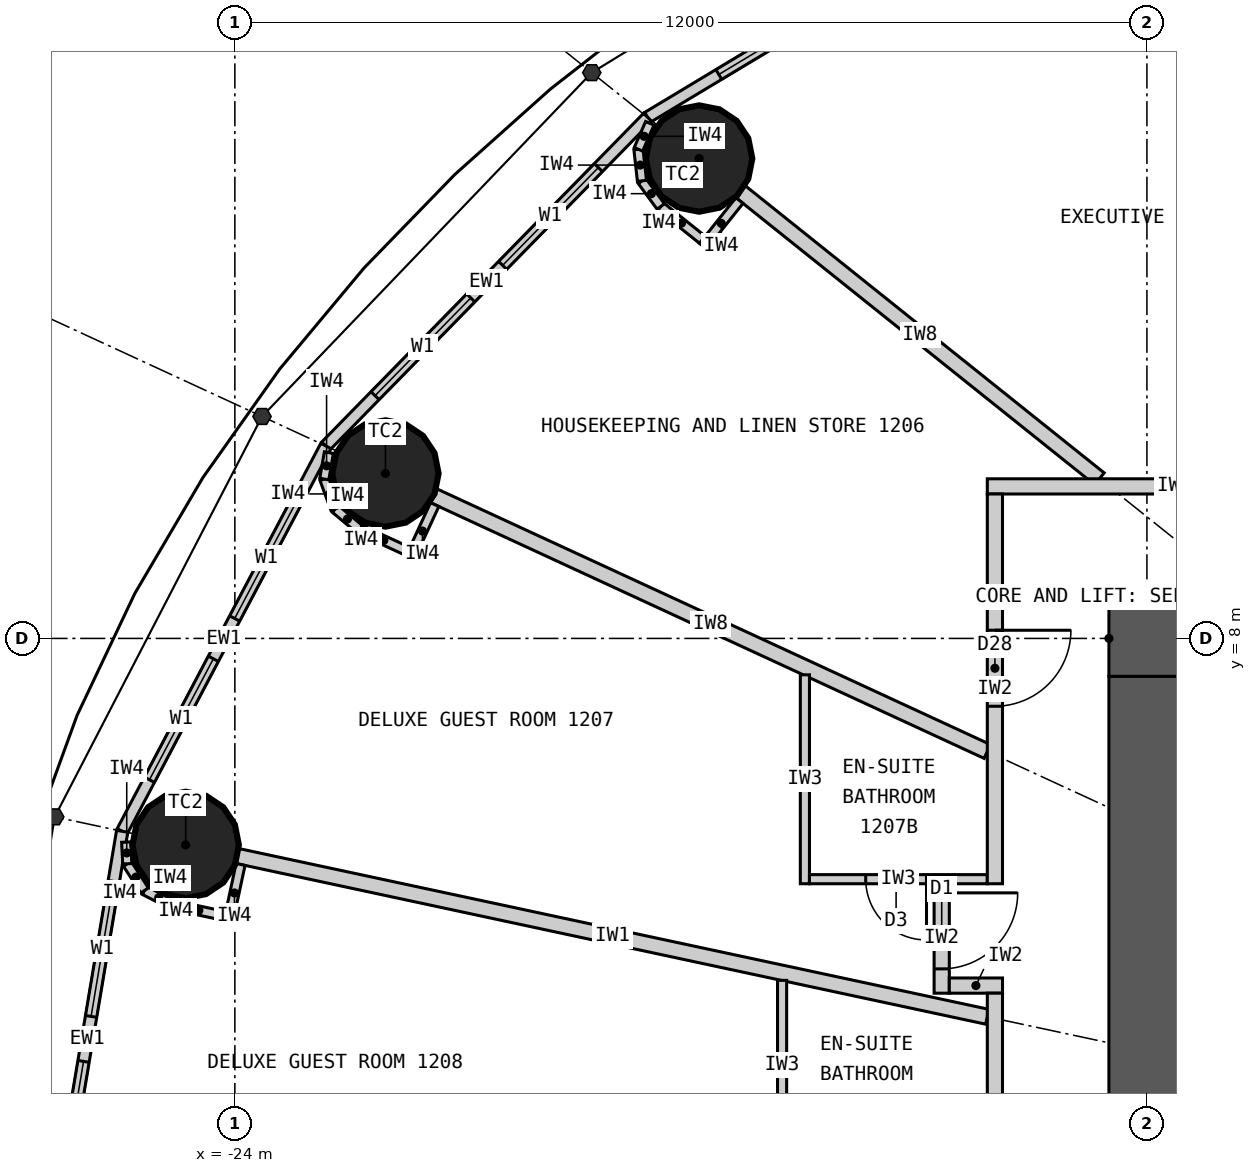
"""IFC4 building model, lengths in metres.
Left out: names, types, materials, properties, quantities, classifications, styles, units other than length and angle.
Written with IfcOpenShell. Run it as: python <this file> out.ifc"""

import sys

from ifc_helpers import new_model, si_unit, direction, frame, frame_2d, origin, origin_2d, place, context, subcontext, project, spatial, rectangle, circle, extrude, element, fill, save


model = new_model("IFC4")
c1 = context("Model", 3, precision=1e-05, world=origin(), true_north=direction((0.0, 1.0)))
c2 = subcontext(c1, "Body", "Model", "MODEL_VIEW")
j1 = project(units=[si_unit("LENGTHUNIT", "METRE"), si_unit("PLANEANGLEUNIT", "RADIAN")], contexts=[c1])
p1 = place(None, origin())
s1 = spatial("IfcSite", under=j1, at=p1, CompositionType="ELEMENT")
p2 = place(p1, origin())
s2 = spatial("IfcBuilding", under=s1, at=p2, CompositionType="ELEMENT")
p3 = place(p2, frame((0.0, 0.0, 54.0)))
s3 = spatial("IfcBuildingStorey", under=s2, at=p3, CompositionType="ELEMENT", Elevation=54.0)
for number, where, z_axis, x_axis in (
    (1, (-17.892, 14.313, 0.0), (0.0, 0.0, 1.0), (1.0, 0.0, 0.0)),
    (2, (-22.019, 10.17, 0.0), (0.0, 0.0, 1.0), (1.0, 0.0, 0.0)),
    (3, (-24.647, 5.283, 0.0), (0.0, 0.0, 1.0), (1.0, 0.0, 0.0)),
):
    element("IfcColumn", number, at=place(p3, frame(where, z_axis=z_axis, x_axis=x_axis)), inside=s3, PredefinedType="COLUMN", context=c2, shape_type="SweptSolid", body=[
        extrude(circle(Radius=0.7, at=origin_2d()), origin(), (0.0, 0.0, 1.0), 3.3),
    ])
p4 = place(p3, frame((-12.5, 8.0, 0.0), z_axis=(0.0, 0.0, 1.0), x_axis=(1.0, 0.0, 0.0)))
e4 = element("IfcWall", 4, at=p4, inside=s3, PredefinedType="SHEAR", context=c2, shape_type="SweptSolid", body=[
    extrude(rectangle(XDim=25.0, YDim=1.0, at=frame_2d((12.5, 0.0))), origin(), (0.0, 0.0, 1.0), 3.3),
])
p5 = place(p4, frame((11.2, 0.0, 0.0)))
e5 = element("IfcOpeningElement", 5, at=p5, cuts=e4, PredefinedType="OPENING", context=c2, shape_type="SweptSolid", body=[
    extrude(rectangle(XDim=1.2, YDim=2.2, at=frame_2d((0.6, 1.1))), frame((0.0, 0.51, 0.0), z_axis=(0.0, -1.0, 0.0), x_axis=(1.0, 0.0, 0.0)), (0.0, 0.0, 1.0), 1.02),
])
p6 = place(p4, frame((18.8, 0.0, 0.0)))
e6 = element("IfcOpeningElement", 6, at=p6, cuts=e4, PredefinedType="OPENING", context=c2, shape_type="SweptSolid", body=[
    extrude(rectangle(XDim=0.9, YDim=2.2, at=frame_2d((0.45, 1.1))), frame((0.0, 0.51, 0.0), z_axis=(0.0, -1.0, 0.0), x_axis=(1.0, 0.0, 0.0)), (0.0, 0.0, 1.0), 1.02),
])
p7 = place(p3, frame((-12.0, 7.5, 0.0), z_axis=(0.0, 0.0, 1.0), x_axis=(0.0, -1.0, 0.0)))
e7 = element("IfcWall", 7, at=p7, inside=s3, PredefinedType="SHEAR", context=c2, shape_type="SweptSolid", body=[
    extrude(rectangle(XDim=15.0, YDim=1.0, at=frame_2d((7.5, 0.0))), origin(), (0.0, 0.0, 1.0), 3.3),
])
p8 = place(p7, frame((6.6, 0.0, 0.0)))
e8 = element("IfcOpeningElement", 8, at=p8, cuts=e7, PredefinedType="OPENING", context=c2, shape_type="SweptSolid", body=[
    extrude(rectangle(XDim=1.8, YDim=2.2, at=frame_2d((0.9, 1.1))), frame((0.0, 0.51, 0.0), z_axis=(0.0, -1.0, 0.0), x_axis=(1.0, 0.0, 0.0)), (0.0, 0.0, 1.0), 1.02),
])
p9 = place(p3, frame((-13.096, 18.147, 0.0), z_axis=(0.0, 0.0, 1.0), x_axis=(-0.856983180864, -0.515344377787, 0.0)))
e9 = element("IfcWall", 9, at=p9, inside=s3, PredefinedType="ELEMENTEDWALL", context=c2, shape_type="SweptSolid", body=[
    extrude(rectangle(XDim=6.386, YDim=0.15, at=frame_2d((3.193, 0.0))), origin(), (0.0, 0.0, 1.0), 3.12),
])
p10 = place(p9, frame((1.093, 0.0, 0.9)))
e10 = element("IfcOpeningElement", 10, at=p10, cuts=e9, PredefinedType="OPENING", context=c2, shape_type="SweptSolid", body=[
    extrude(rectangle(XDim=1.8, YDim=1.9, at=frame_2d((0.9, 0.95))), frame((0.0, 0.085, 0.0), z_axis=(0.0, -1.0, 0.0), x_axis=(1.0, 0.0, 0.0)), (0.0, 0.0, 1.0), 0.17),
])
p11 = place(p9, frame((3.493, 0.0, 0.9)))
e11 = element("IfcOpeningElement", 11, at=p11, cuts=e9, PredefinedType="OPENING", context=c2, shape_type="SweptSolid", body=[
    extrude(rectangle(XDim=1.8, YDim=1.9, at=frame_2d((0.9, 0.95))), frame((0.0, 0.085, 0.0), z_axis=(0.0, -1.0, 0.0), x_axis=(1.0, 0.0, 0.0)), (0.0, 0.0, 1.0), 0.17),
])
p12 = place(p3, frame((-18.57, 14.856, 0.0), z_axis=(0.0, 0.0, 1.0), x_axis=(-0.699602905915, -0.714531856557, 0.0)))
e12 = element("IfcWall", 12, at=p12, inside=s3, PredefinedType="ELEMENTEDWALL", context=c2, shape_type="SweptSolid", body=[
    extrude(rectangle(XDim=6.051, YDim=0.15, at=frame_2d((3.025, 0.0))), origin(), (0.0, 0.0, 1.0), 3.12),
])
p13 = place(p12, frame((0.926, 0.0, 0.9)))
e13 = element("IfcOpeningElement", 13, at=p13, cuts=e12, PredefinedType="OPENING", context=c2, shape_type="SweptSolid", body=[
    extrude(rectangle(XDim=1.8, YDim=1.9, at=frame_2d((0.9, 0.95))), frame((0.0, 0.085, 0.0), z_axis=(0.0, -1.0, 0.0), x_axis=(1.0, 0.0, 0.0)), (0.0, 0.0, 1.0), 0.17),
])
p14 = place(p12, frame((3.325, 0.0, 0.9)))
e14 = element("IfcOpeningElement", 14, at=p14, cuts=e12, PredefinedType="OPENING", context=c2, shape_type="SweptSolid", body=[
    extrude(rectangle(XDim=1.8, YDim=1.9, at=frame_2d((0.9, 0.95))), frame((0.0, 0.085, 0.0), z_axis=(0.0, -1.0, 0.0), x_axis=(1.0, 0.0, 0.0)), (0.0, 0.0, 1.0), 0.17),
])
p15 = place(p3, frame((-22.803, 10.532, 0.0), z_axis=(0.0, 0.0, 1.0), x_axis=(-0.467296867008, -0.884100468321, 0.0)))
e15 = element("IfcWall", 15, at=p15, inside=s3, PredefinedType="ELEMENTEDWALL", context=c2, shape_type="SweptSolid", body=[
    extrude(rectangle(XDim=5.734, YDim=0.15, at=frame_2d((2.867, 0.0))), origin(), (0.0, 0.0, 1.0), 3.12),
])
p16 = place(p15, frame((0.767, 0.0, 0.9)))
e16 = element("IfcOpeningElement", 16, at=p16, cuts=e15, PredefinedType="OPENING", context=c2, shape_type="SweptSolid", body=[
    extrude(rectangle(XDim=1.8, YDim=1.9, at=frame_2d((0.9, 0.95))), frame((0.0, 0.085, 0.0), z_axis=(0.0, -1.0, 0.0), x_axis=(1.0, 0.0, 0.0)), (0.0, 0.0, 1.0), 0.17),
])
p17 = place(p15, frame((3.167, 0.0, 0.9)))
e17 = element("IfcOpeningElement", 17, at=p17, cuts=e15, PredefinedType="OPENING", context=c2, shape_type="SweptSolid", body=[
    extrude(rectangle(XDim=1.8, YDim=1.9, at=frame_2d((0.9, 0.95))), frame((0.0, 0.085, 0.0), z_axis=(0.0, -1.0, 0.0), x_axis=(1.0, 0.0, 0.0)), (0.0, 0.0, 1.0), 0.17),
])
p18 = place(p3, frame((-25.482, 5.462, 0.0), z_axis=(0.0, 0.0, 1.0), x_axis=(-0.165642551694, -0.986185857264, 0.0)))
e18 = element("IfcWall", 18, at=p18, inside=s3, PredefinedType="ELEMENTEDWALL", context=c2, shape_type="SweptSolid", body=[
    extrude(rectangle(XDim=5.539, YDim=0.15, at=frame_2d((2.77, 0.0))), origin(), (0.0, 0.0, 1.0), 3.12),
])
p19 = place(p18, frame((0.669, 0.0, 0.9)))
e19 = element("IfcOpeningElement", 19, at=p19, cuts=e18, PredefinedType="OPENING", context=c2, shape_type="SweptSolid", body=[
    extrude(rectangle(XDim=1.8, YDim=1.9, at=frame_2d((0.9, 0.95))), frame((0.0, 0.085, 0.0), z_axis=(0.0, -1.0, 0.0), x_axis=(1.0, 0.0, 0.0)), (0.0, 0.0, 1.0), 0.17),
])
p20 = place(p18, frame((3.07, 0.0, 0.9)))
e20 = element("IfcOpeningElement", 20, at=p20, cuts=e18, PredefinedType="OPENING", context=c2, shape_type="SweptSolid", body=[
    extrude(rectangle(XDim=1.8, YDim=1.9, at=frame_2d((0.9, 0.95))), frame((0.0, 0.085, 0.0), z_axis=(0.0, -1.0, 0.0), x_axis=(1.0, 0.0, 0.0)), (0.0, 0.0, 1.0), 0.17),
])
p21 = place(p3, frame((-12.625, 10.1, 0.0), z_axis=(0.0, 0.0, 1.0), x_axis=(-0.780892451574, 0.624665493744, 0.0)))
e21 = element("IfcWall", 21, at=p21, inside=s3, PredefinedType="PARTITIONING", context=c2, shape_type="SweptSolid", body=[
    extrude(rectangle(XDim=6.045, YDim=0.2, at=frame_2d((3.022, 0.0))), origin(), (0.0, 0.0, 1.0), 2.32),
])
p22 = place(p3, frame((-14.1, 6.512, 0.0), z_axis=(0.0, 0.0, 1.0), x_axis=(-0.907832871056, 0.419332181247, 0.0)))
e22 = element("IfcWall", 22, at=p22, inside=s3, PredefinedType="PARTITIONING", context=c2, shape_type="SweptSolid", body=[
    extrude(rectangle(XDim=8.023, YDim=0.2, at=frame_2d((4.011, 0.0))), origin(), (0.0, 0.0, 1.0), 2.32),
])
p23 = place(p3, frame((-14.1, 3.022, 0.0), z_axis=(0.0, 0.0, 1.0), x_axis=(-0.977790014929, 0.209586943072, 0.0)))
e23 = element("IfcWall", 23, at=p23, inside=s3, PredefinedType="PARTITIONING", context=c2, shape_type="SweptSolid", body=[
    extrude(rectangle(XDim=10.087, YDim=0.2, at=frame_2d((5.043, 0.0))), origin(), (0.0, 0.0, 1.0), 2.32),
])
p24 = place(p3, frame((-16.5, 7.521, 0.0), z_axis=(0.0, 0.0, 1.0), x_axis=(0.0, -1.0, 0.0)))
e24 = element("IfcWall", 24, at=p24, inside=s3, PredefinedType="PARTITIONING", context=c2, shape_type="SweptSolid", body=[
    extrude(rectangle(XDim=2.749, YDim=0.12, at=frame_2d((1.374, 0.0))), origin(), (0.0, 0.0, 1.0), 3.12),
])
p25 = place(p3, frame((-14.1, 4.833, 0.0), z_axis=(0.0, 0.0, 1.0), x_axis=(-1.0, 0.0, 0.0)))
e25 = element("IfcWall", 25, at=p25, inside=s3, PredefinedType="PARTITIONING", context=c2, shape_type="SweptSolid", body=[
    extrude(rectangle(XDim=2.34, YDim=0.12, at=frame_2d((1.17, 0.0))), origin(), (0.0, 0.0, 1.0), 3.12),
])
p26 = place(p25, frame((0.8, 0.0, 0.0)))
e26 = element("IfcOpeningElement", 26, at=p26, cuts=e25, PredefinedType="OPENING", context=c2, shape_type="SweptSolid", body=[
    extrude(rectangle(XDim=0.8, YDim=2.1, at=frame_2d((0.4, 1.05))), frame((0.0, 0.07, 0.0), z_axis=(0.0, -1.0, 0.0), x_axis=(1.0, 0.0, 0.0)), (0.0, 0.0, 1.0), 0.14),
])
p27 = place(p3, frame((-16.8, 3.501, 0.0), z_axis=(0.0, 0.0, 1.0), x_axis=(0.0, -1.0, 0.0)))
e27 = element("IfcWall", 27, at=p27, inside=s3, PredefinedType="PARTITIONING", context=c2, shape_type="SweptSolid", body=[
    extrude(rectangle(XDim=2.219, YDim=0.12, at=frame_2d((1.109, 0.0))), origin(), (0.0, 0.0, 1.0), 3.12),
])
p28 = place(p3, frame((-14.7, 4.772, 0.0), z_axis=(0.0, 0.0, 1.0), x_axis=(0.0, -1.0, 0.0)))
e28 = element("IfcWall", 28, at=p28, inside=s3, PredefinedType="PARTITIONING", context=c2, shape_type="SweptSolid", body=[
    extrude(rectangle(XDim=1.44, YDim=0.2, at=frame_2d((0.72, 0.0))), origin(), (0.0, 0.0, 1.0), 3.12),
])
p29 = place(p28, frame((0.12, 0.0, 0.0)))
e29 = element("IfcOpeningElement", 29, at=p29, cuts=e28, PredefinedType="OPENING", context=c2, shape_type="SweptSolid", body=[
    extrude(rectangle(XDim=1.0, YDim=2.2, at=frame_2d((0.5, 1.1))), frame((0.0, 0.11, 0.0), z_axis=(0.0, -1.0, 0.0), x_axis=(1.0, 0.0, 0.0)), (0.0, 0.0, 1.0), 0.22),
])
p30 = place(p3, frame((-13.9, 3.433, 0.0), z_axis=(0.0, 0.0, 1.0), x_axis=(-1.0, 0.0, 0.0)))
e30 = element("IfcWall", 30, at=p30, inside=s3, PredefinedType="PARTITIONING", context=c2, shape_type="SweptSolid", body=[
    extrude(rectangle(XDim=0.7, YDim=0.2, at=frame_2d((0.35, 0.0))), origin(), (0.0, 0.0, 1.0), 2.32),
])
p31 = place(p3, frame((-14.1, 10.0, 0.0), z_axis=(0.0, 0.0, 1.0), x_axis=(1.0, 0.0, 0.0)))
e31 = element("IfcWall", 31, at=p31, inside=s3, PredefinedType="PARTITIONING", context=c2, shape_type="SweptSolid", body=[
    extrude(rectangle(XDim=4.931, YDim=0.2, at=frame_2d((2.466, 0.0))), origin(), (0.0, 0.0, 1.0), 3.12),
])
p32 = place(p3, frame((-14.0, 9.9, 0.0), z_axis=(0.0, 0.0, 1.0), x_axis=(0.0, -1.0, 0.0)))
e32 = element("IfcWall", 32, at=p32, inside=s3, PredefinedType="PARTITIONING", context=c2, shape_type="SweptSolid", body=[
    extrude(rectangle(XDim=5.127, YDim=0.2, at=frame_2d((2.564, 0.0))), origin(), (0.0, 0.0, 1.0), 3.12),
])
p33 = place(p32, frame((1.792, 0.0, 0.0)))
e33 = element("IfcOpeningElement", 33, at=p33, cuts=e32, PredefinedType="OPENING", context=c2, shape_type="SweptSolid", body=[
    extrude(rectangle(XDim=1.0, YDim=2.2, at=frame_2d((0.5, 1.1))), frame((0.0, 0.11, 0.0), z_axis=(0.0, -1.0, 0.0), x_axis=(1.0, 0.0, 0.0)), (0.0, 0.0, 1.0), 0.22),
])
p34 = place(p3, frame((-14.0, 3.333, 0.0), z_axis=(0.0, 0.0, 1.0), x_axis=(0.0, -1.0, 0.0)))
e34 = element("IfcWall", 34, at=p34, inside=s3, PredefinedType="PARTITIONING", context=c2, shape_type="SweptSolid", body=[
    extrude(rectangle(XDim=6.665, YDim=0.2, at=frame_2d((3.333, 0.0))), origin(), (0.0, 0.0, 1.0), 3.12),
])
p35 = place(p34, frame((2.15, 0.0, 0.0)))
e35 = element("IfcOpeningElement", 35, at=p35, cuts=e34, PredefinedType="OPENING", context=c2, shape_type="SweptSolid", body=[
    extrude(rectangle(XDim=1.0, YDim=2.2, at=frame_2d((0.5, 1.1))), frame((0.0, 0.11, 0.0), z_axis=(0.0, -1.0, 0.0), x_axis=(1.0, 0.0, 0.0)), (0.0, 0.0, 1.0), 0.22),
])
p36 = place(p34, frame((5.173, 0.0, 0.0)))
e36 = element("IfcOpeningElement", 36, at=p36, cuts=e34, PredefinedType="OPENING", context=c2, shape_type="SweptSolid", body=[
    extrude(rectangle(XDim=1.0, YDim=2.2, at=frame_2d((0.5, 1.1))), frame((0.0, 0.11, 0.0), z_axis=(0.0, -1.0, 0.0), x_axis=(1.0, 0.0, 0.0)), (0.0, 0.0, 1.0), 0.22),
])
p37 = place(p3, frame((-17.361, 13.76, 0.0), z_axis=(0.0, 0.0, 1.0), x_axis=(-0.624501042889, -0.781023973659, 0.0)))
e37 = element("IfcWall", 37, at=p37, inside=s3, PredefinedType="PARTITIONING", context=c2, shape_type="SweptSolid", body=[
    extrude(rectangle(XDim=0.767, YDim=0.12, at=frame_2d((0.384, 0.0))), origin(), (0.0, 0.0, 1.0), 3.12),
])
p38 = place(p3, frame((-17.85, 13.246, 0.0), z_axis=(0.0, 0.0, 1.0), x_axis=(-0.780902834923, 0.62465251333, 0.0)))
e38 = element("IfcWall", 38, at=p38, inside=s3, PredefinedType="PARTITIONING", context=c2, shape_type="SweptSolid", body=[
    extrude(rectangle(XDim=0.7, YDim=0.12, at=frame_2d((0.35, 0.0))), origin(), (0.0, 0.0, 1.0), 3.12),
])
for number, where, z_axis, x_axis in (
    (39, (-18.396, 13.683, 0.0), (0.0, 0.0, 1.0), (-0.592, 0.806, 0.0)),
    (40, (-18.644, 14.02, 0.0), (0.0, 0.0, 1.0), (-0.11, 0.994, 0.0)),
):
    element("IfcWall", number, at=place(p3, frame(where, z_axis=z_axis, x_axis=x_axis)), inside=s3, PredefinedType="PARTITIONING", context=c2, shape_type="SweptSolid", body=[
        extrude(rectangle(XDim=0.418, YDim=0.12, at=frame_2d((0.209, 0.0))), origin(), (0.0, 0.0, 1.0), 3.12),
    ])
p39 = place(p3, frame((-18.69, 14.435, 0.0), z_axis=(0.0, 0.0, 1.0), x_axis=(0.401093412634, 0.91603715773, 0.0)))
e41 = element("IfcWall", 41, at=p39, inside=s3, PredefinedType="PARTITIONING", context=c2, shape_type="SweptSolid", body=[
    extrude(rectangle(XDim=0.373, YDim=0.12, at=frame_2d((0.187, 0.0))), origin(), (0.0, 0.0, 1.0), 3.12),
])
p40 = place(p3, frame((-21.371, 9.761, 0.0), z_axis=(0.0, 0.0, 1.0), x_axis=(-0.419259891039, -0.907866258744, 0.0)))
e42 = element("IfcWall", 42, at=p40, inside=s3, PredefinedType="PARTITIONING", context=c2, shape_type="SweptSolid", body=[
    extrude(rectangle(XDim=0.768, YDim=0.12, at=frame_2d((0.384, 0.0))), origin(), (0.0, 0.0, 1.0), 3.12),
])
p41 = place(p3, frame((-21.722, 9.144, 0.0), z_axis=(0.0, 0.0, 1.0), x_axis=(-0.907877701396, 0.419235112208, 0.0)))
e43 = element("IfcWall", 43, at=p41, inside=s3, PredefinedType="PARTITIONING", context=c2, shape_type="SweptSolid", body=[
    extrude(rectangle(XDim=0.7, YDim=0.12, at=frame_2d((0.35, 0.0))), origin(), (0.0, 0.0, 1.0), 3.12),
])
p42 = place(p3, frame((-22.358, 9.437, 0.0), z_axis=(0.0, 0.0, 1.0), x_axis=(-0.768412687942, 0.639954639806, 0.0)))
e44 = element("IfcWall", 44, at=p42, inside=s3, PredefinedType="PARTITIONING", context=c2, shape_type="SweptSolid", body=[
    extrude(rectangle(XDim=0.418, YDim=0.12, at=frame_2d((0.209, 0.0))), origin(), (0.0, 0.0, 1.0), 3.12),
])
p43 = place(p3, frame((-22.679, 9.705, 0.0), z_axis=(0.0, 0.0, 1.0), x_axis=(-0.345164001646, 0.938542386879, 0.0)))
e45 = element("IfcWall", 45, at=p43, inside=s3, PredefinedType="PARTITIONING", context=c2, shape_type="SweptSolid", body=[
    extrude(rectangle(XDim=0.418, YDim=0.12, at=frame_2d((0.209, 0.0))), origin(), (0.0, 0.0, 1.0), 3.12),
])
p44 = place(p3, frame((-22.823, 10.097, 0.0), z_axis=(0.0, 0.0, 1.0), x_axis=(0.169674995186, 0.985500074079, 0.0)))
e46 = element("IfcWall", 46, at=p44, inside=s3, PredefinedType="PARTITIONING", context=c2, shape_type="SweptSolid", body=[
    extrude(rectangle(XDim=0.353, YDim=0.12, at=frame_2d((0.176, 0.0))), origin(), (0.0, 0.0, 1.0), 3.12),
])
p45 = place(p3, frame((-23.925, 5.026, 0.0), z_axis=(0.0, 0.0, 1.0), x_axis=(-0.209681192172, -0.977769808109, 0.0)))
e47 = element("IfcWall", 47, at=p45, inside=s3, PredefinedType="PARTITIONING", context=c2, shape_type="SweptSolid", body=[
    extrude(rectangle(XDim=0.767, YDim=0.12, at=frame_2d((0.384, 0.0))), origin(), (0.0, 0.0, 1.0), 3.12),
])
p46 = place(p3, frame((-24.132, 4.347, 0.0), z_axis=(0.0, 0.0, 1.0), x_axis=(-0.977776882509, 0.209648200638, 0.0)))
e48 = element("IfcWall", 48, at=p46, inside=s3, PredefinedType="PARTITIONING", context=c2, shape_type="SweptSolid", body=[
    extrude(rectangle(XDim=0.7, YDim=0.12, at=frame_2d((0.35, 0.0))), origin(), (0.0, 0.0, 1.0), 3.12),
])
for number, where, z_axis, x_axis in (
    (49, (-24.816, 4.494, 0.0), (0.0, 0.0, 1.0), (-0.89, 0.455, 0.0)),
    (50, (-25.188, 4.684, 0.0), (0.0, 0.0, 1.0), (-0.543, 0.84, 0.0)),
):
    element("IfcWall", number, at=place(p3, frame(where, z_axis=z_axis, x_axis=x_axis)), inside=s3, PredefinedType="PARTITIONING", context=c2, shape_type="SweptSolid", body=[
        extrude(rectangle(XDim=0.418, YDim=0.12, at=frame_2d((0.209, 0.0))), origin(), (0.0, 0.0, 1.0), 3.12),
    ])
p47 = place(p3, frame((-25.416, 5.035, 0.0), z_axis=(0.0, 0.0, 1.0), x_axis=(-0.050406329159, 0.998728793007, 0.0)))
e51 = element("IfcWall", 51, at=p47, inside=s3, PredefinedType="PARTITIONING", context=c2, shape_type="SweptSolid", body=[
    extrude(rectangle(XDim=0.286, YDim=0.12, at=frame_2d((0.143, 0.0))), origin(), (0.0, 0.0, 1.0), 3.12),
])
p48 = place(p11, origin())
e52 = element("IfcWindow", 52, at=p48, inside=s3, PartitioningType="SINGLE_PANEL", PredefinedType="WINDOW", context=c2, shape_type="SweptSolid", body=[
    extrude(rectangle(XDim=1.8, YDim=1.9, at=frame_2d((0.9, 0.95))), frame((0.0, 0.03, 0.0), z_axis=(0.0, -1.0, 0.0), x_axis=(1.0, 0.0, 0.0)), (0.0, 0.0, 1.0), 0.06),
])
fill(e11, e52)
p49 = place(p13, origin())
e53 = element("IfcWindow", 53, at=p49, inside=s3, PartitioningType="SINGLE_PANEL", PredefinedType="WINDOW", context=c2, shape_type="SweptSolid", body=[
    extrude(rectangle(XDim=1.8, YDim=1.9, at=frame_2d((0.9, 0.95))), frame((0.0, 0.03, 0.0), z_axis=(0.0, -1.0, 0.0), x_axis=(1.0, 0.0, 0.0)), (0.0, 0.0, 1.0), 0.06),
])
fill(e13, e53)
p50 = place(p14, origin())
e54 = element("IfcWindow", 54, at=p50, inside=s3, PartitioningType="SINGLE_PANEL", PredefinedType="WINDOW", context=c2, shape_type="SweptSolid", body=[
    extrude(rectangle(XDim=1.8, YDim=1.9, at=frame_2d((0.9, 0.95))), frame((0.0, 0.03, 0.0), z_axis=(0.0, -1.0, 0.0), x_axis=(1.0, 0.0, 0.0)), (0.0, 0.0, 1.0), 0.06),
])
fill(e14, e54)
p51 = place(p16, origin())
e55 = element("IfcWindow", 55, at=p51, inside=s3, PartitioningType="SINGLE_PANEL", PredefinedType="WINDOW", context=c2, shape_type="SweptSolid", body=[
    extrude(rectangle(XDim=1.8, YDim=1.9, at=frame_2d((0.9, 0.95))), frame((0.0, 0.03, 0.0), z_axis=(0.0, -1.0, 0.0), x_axis=(1.0, 0.0, 0.0)), (0.0, 0.0, 1.0), 0.06),
])
fill(e16, e55)
p52 = place(p17, origin())
e56 = element("IfcWindow", 56, at=p52, inside=s3, PartitioningType="SINGLE_PANEL", PredefinedType="WINDOW", context=c2, shape_type="SweptSolid", body=[
    extrude(rectangle(XDim=1.8, YDim=1.9, at=frame_2d((0.9, 0.95))), frame((0.0, 0.03, 0.0), z_axis=(0.0, -1.0, 0.0), x_axis=(1.0, 0.0, 0.0)), (0.0, 0.0, 1.0), 0.06),
])
fill(e17, e56)
p53 = place(p19, origin())
e57 = element("IfcWindow", 57, at=p53, inside=s3, PartitioningType="SINGLE_PANEL", PredefinedType="WINDOW", context=c2, shape_type="SweptSolid", body=[
    extrude(rectangle(XDim=1.8, YDim=1.9, at=frame_2d((0.9, 0.95))), frame((0.0, 0.03, 0.0), z_axis=(0.0, -1.0, 0.0), x_axis=(1.0, 0.0, 0.0)), (0.0, 0.0, 1.0), 0.06),
])
fill(e19, e57)
p54 = place(p20, origin())
e58 = element("IfcWindow", 58, at=p54, inside=s3, PartitioningType="SINGLE_PANEL", PredefinedType="WINDOW", context=c2, shape_type="SweptSolid", body=[
    extrude(rectangle(XDim=1.8, YDim=1.9, at=frame_2d((0.9, 0.95))), frame((0.0, 0.03, 0.0), z_axis=(0.0, -1.0, 0.0), x_axis=(1.0, 0.0, 0.0)), (0.0, 0.0, 1.0), 0.06),
])
fill(e20, e58)
p55 = place(p33, origin())
e59 = element("IfcDoor", 59, at=p55, inside=s3, OperationType="SINGLE_SWING_LEFT", PredefinedType="DOOR", context=c2, shape_type="SweptSolid", body=[
    extrude(rectangle(XDim=1.0, YDim=2.2, at=frame_2d((0.5, 1.1))), frame((0.0, 0.025, 0.0), z_axis=(0.0, -1.0, 0.0), x_axis=(1.0, 0.0, 0.0)), (0.0, 0.0, 1.0), 0.05),
])
fill(e33, e59)
p56 = place(p26, origin())
e60 = element("IfcDoor", 60, at=p56, inside=s3, OperationType="SINGLE_SWING_LEFT", PredefinedType="DOOR", context=c2, shape_type="SweptSolid", body=[
    extrude(rectangle(XDim=0.8, YDim=2.1, at=frame_2d((0.4, 1.05))), frame((0.0, 0.025, 0.0), z_axis=(0.0, -1.0, 0.0), x_axis=(1.0, 0.0, 0.0)), (0.0, 0.0, 1.0), 0.05),
])
fill(e26, e60)
p57 = place(p29, origin())
e61 = element("IfcDoor", 61, at=p57, inside=s3, OperationType="SINGLE_SWING_LEFT", PredefinedType="DOOR", context=c2, shape_type="SweptSolid", body=[
    extrude(rectangle(XDim=1.0, YDim=2.2, at=frame_2d((0.5, 1.1))), frame((0.0, 0.025, 0.0), z_axis=(0.0, -1.0, 0.0), x_axis=(1.0, 0.0, 0.0)), (0.0, 0.0, 1.0), 0.05),
])
fill(e29, e61)
save(model, sys.argv[1])
